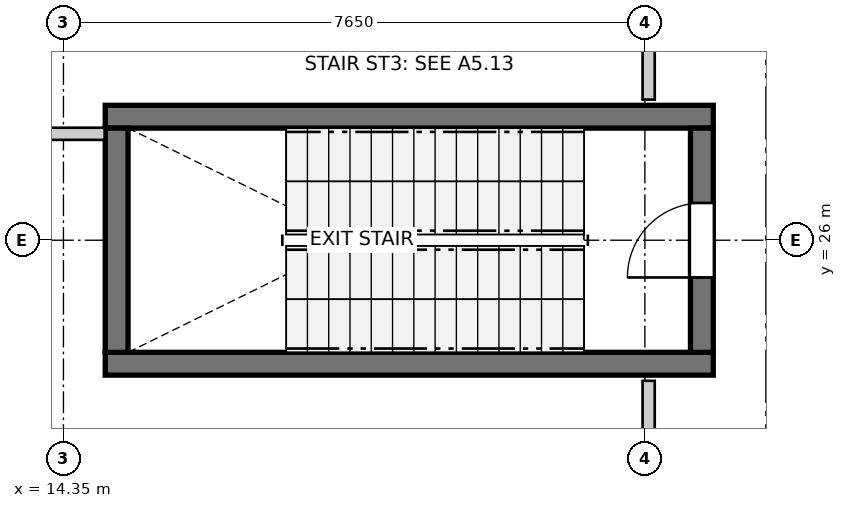
"""IFC4 building model, lengths in metres.
Left out: names, types, materials, properties, quantities, classifications, styles, units other than length and angle.
Written with IfcOpenShell. Run it as: python <this file> out.ifc"""

import sys

from ifc_helpers import new_model, si_unit, direction, frame, frame_2d, origin, place, context, subcontext, project, spatial, rectangle, extrude, source, transform, mapped, element, fill, save


model = new_model("IFC4")
c1 = context("Model", 3, precision=1e-05, world=origin(), true_north=direction((0.0, 1.0)))
c2 = subcontext(c1, "Body", "Model", "MODEL_VIEW")
j1 = project(units=[si_unit("LENGTHUNIT", "METRE"), si_unit("PLANEANGLEUNIT", "RADIAN")], contexts=[c1])
p1 = place(None, origin())
s1 = spatial("IfcSite", under=j1, at=p1, CompositionType="ELEMENT")
p2 = place(p1, origin())
s2 = spatial("IfcBuilding", under=s1, at=p2, CompositionType="ELEMENT")
p3 = place(p2, frame((0.0, 0.0, 190.6)))
s3 = spatial("IfcBuildingStorey", under=s2, at=p3, CompositionType="ELEMENT", Elevation=190.6)
for number, where, z_axis, x_axis in (
    (1, (14.9, 24.375, 0.0), (0.0, 0.0, 1.0), (1.0, 0.0, 0.0)),
    (2, (22.9, 27.625, 0.0), (0.0, 0.0, 1.0), (-1.0, 0.0, 0.0)),
):
    element("IfcWall", number, at=place(p3, frame(where, z_axis=z_axis, x_axis=x_axis)), inside=s3, PredefinedType="SHEAR", context=c2, shape_type="SweptSolid", body=[
        extrude(rectangle(XDim=8.0, YDim=0.3, at=frame_2d((4.0, 0.0))), origin(), (0.0, 0.0, 1.0), 4.76),
    ])
p4 = place(p3, frame((15.05, 27.475, 0.0), z_axis=(0.0, 0.0, 1.0), x_axis=(0.0, -1.0, 0.0)))
e3 = element("IfcWall", 3, at=p4, inside=s3, PredefinedType="SHEAR", context=c2, shape_type="SweptSolid", body=[
    extrude(rectangle(XDim=2.95, YDim=0.3, at=frame_2d((1.475, 0.0))), origin(), (0.0, 0.0, 1.0), 4.76),
])
p5 = place(p3, frame((22.75, 24.525, 0.0), z_axis=(0.0, 0.0, 1.0), x_axis=(0.0, 1.0, 0.0)))
e4 = element("IfcWall", 4, at=p5, inside=s3, PredefinedType="SHEAR", context=c2, shape_type="SweptSolid", body=[
    extrude(rectangle(XDim=2.95, YDim=0.3, at=frame_2d((1.475, 0.0))), origin(), (0.0, 0.0, 1.0), 4.76),
])
p6 = place(p5, frame((0.985, 0.0, 0.0)))
e5 = element("IfcOpeningElement", 5, at=p6, cuts=e4, PredefinedType="OPENING", context=c2, shape_type="SweptSolid", body=[
    extrude(rectangle(XDim=0.98, YDim=2.15, at=frame_2d((0.49, 1.075))), frame((0.0, 0.16, 0.0), z_axis=(0.0, -1.0, 0.0), x_axis=(1.0, 0.0, 0.0)), (0.0, 0.0, 1.0), 0.32),
])
p7 = place(p3, frame((22.05, 15.45, 0.0), z_axis=(0.0, 0.0, 1.0), x_axis=(0.0, 1.0, 0.0)))
e6 = element("IfcWall", 6, at=p7, inside=s3, PredefinedType="PARTITIONING", context=c2, shape_type="SweptSolid", body=[
    extrude(rectangle(XDim=8.7, YDim=0.16, at=frame_2d((4.35, 0.0))), origin(), (0.0, 0.0, 1.0), 4.76),
])
p8 = place(p7, frame((3.688, 0.0, 0.0)))
e7 = element("IfcOpeningElement", 7, at=p8, cuts=e6, PredefinedType="OPENING", context=c2, shape_type="SweptSolid", body=[
    extrude(rectangle(XDim=1.4, YDim=2.15, at=frame_2d((0.7, 1.075))), frame((0.0, 0.09, 0.0), z_axis=(0.0, -1.0, 0.0), x_axis=(1.0, 0.0, 0.0)), (0.0, 0.0, 1.0), 0.18),
])
p9 = place(p3, frame((22.05, 27.85, 0.0), z_axis=(0.0, 0.0, 1.0), x_axis=(0.0, 1.0, 0.0)))
e8 = element("IfcWall", 8, at=p9, inside=s3, PredefinedType="PARTITIONING", context=c2, shape_type="SweptSolid", body=[
    extrude(rectangle(XDim=8.7, YDim=0.16, at=frame_2d((4.35, 0.0))), origin(), (0.0, 0.0, 1.0), 4.76),
])
p10 = place(p9, frame((3.679, 0.0, 0.0)))
e9 = element("IfcOpeningElement", 9, at=p10, cuts=e8, PredefinedType="OPENING", context=c2, shape_type="SweptSolid", body=[
    extrude(rectangle(XDim=1.4, YDim=2.15, at=frame_2d((0.7, 1.075))), frame((0.0, 0.09, 0.0), z_axis=(0.0, -1.0, 0.0), x_axis=(1.0, 0.0, 0.0)), (0.0, 0.0, 1.0), 0.18),
])
p11 = place(p3, frame((7.886, 27.4, 0.0), z_axis=(0.0, 0.0, 1.0), x_axis=(1.0, 0.0, 0.0)))
e10 = element("IfcWall", 10, at=p11, inside=s3, PredefinedType="PARTITIONING", context=c2, shape_type="SweptSolid", body=[
    extrude(rectangle(XDim=7.006, YDim=0.16, at=frame_2d((3.503, 0.0))), origin(), (0.0, 0.0, 1.0), 4.76),
])
m1 = source(origin(), c2, "Body", "SweptSolid", [
    extrude(rectangle(XDim=0.98, YDim=2.15, at=frame_2d((0.49, 1.075))), frame((0.0, 0.025, 0.0), z_axis=(0.0, -1.0, 0.0), x_axis=(1.0, 0.0, 0.0)), (0.0, 0.0, 1.0), 0.05),
])
p12 = place(p6, origin())
e11 = element("IfcDoor", 11, at=p12, inside=s3, OperationType="SINGLE_SWING_LEFT", PredefinedType="DOOR", context=c2, shape_type="MappedRepresentation", body=[
    mapped(m1, transform((0.0, 0.0, 0.0), x_axis=(1.0, 0.0, 0.0), y_axis=(0.0, 1.0, 0.0), z_axis=(0.0, 0.0, 1.0), scale=1.0)),
])
fill(e5, e11)
save(model, sys.argv[1])
